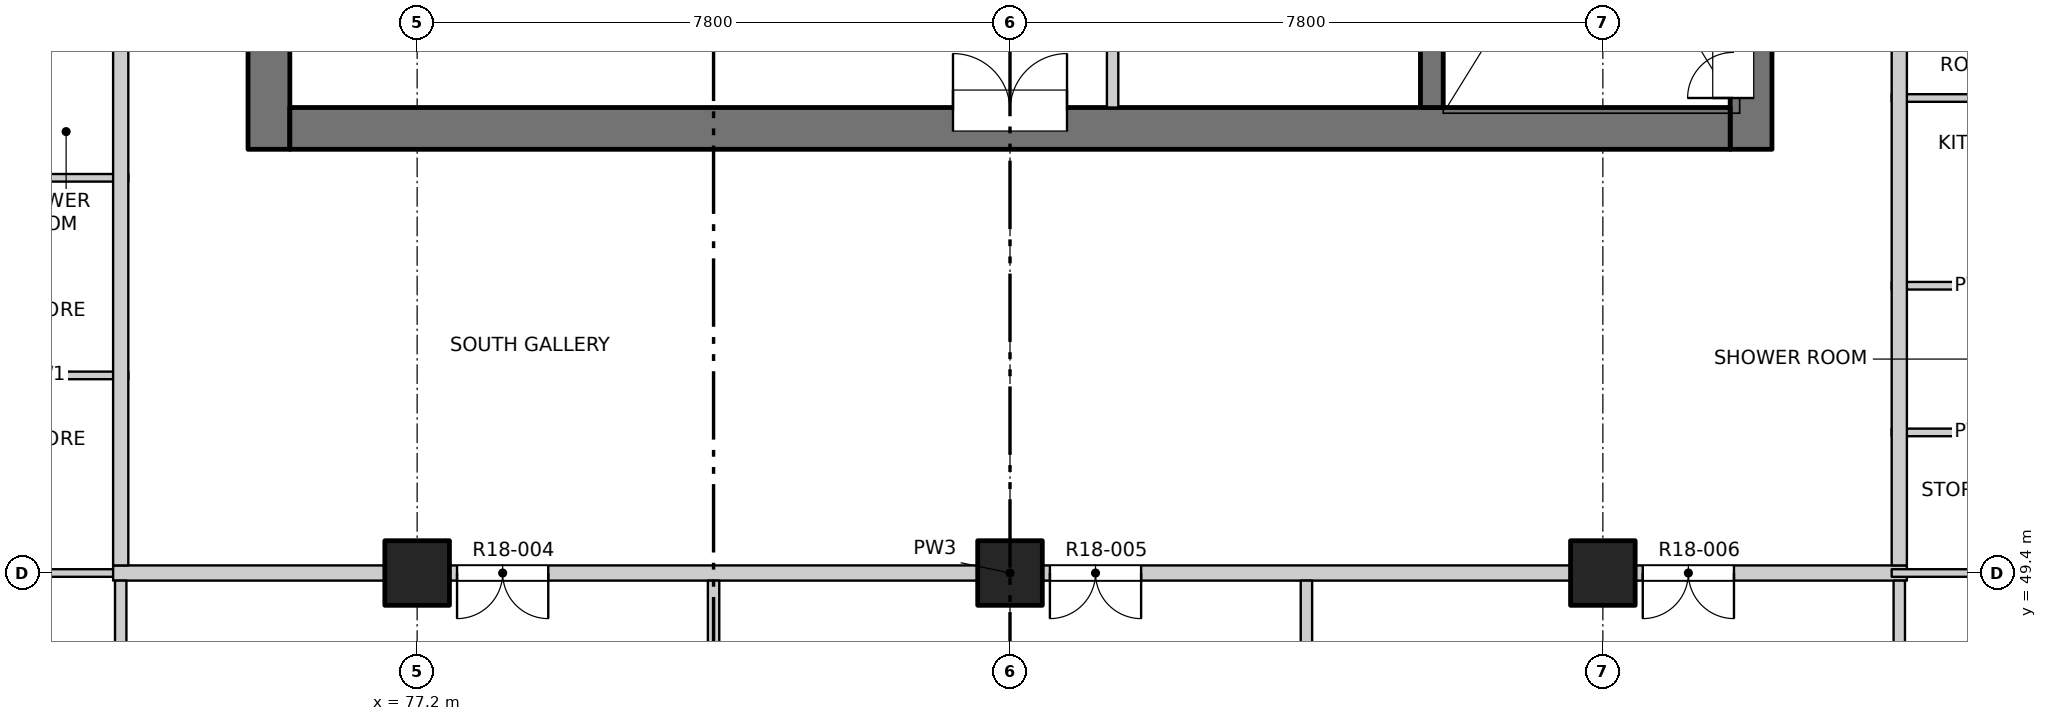
"""IFC4 building model, lengths in metres.
Left out: names, types, materials, properties, quantities, classifications, styles, units other than length and angle.
Written with IfcOpenShell. Run it as: python <this file> out.ifc"""

import sys

from ifc_helpers import new_model, si_unit, direction, frame, frame_2d, origin, origin_2d, place, context, subcontext, project, spatial, rectangle, extrude, element, fill, save


model = new_model("IFC4")
c1 = context("Model", 3, precision=1e-05, world=origin(), true_north=direction((0.0, 1.0)))
c2 = subcontext(c1, "Body", "Model", "MODEL_VIEW")
j1 = project(units=[si_unit("LENGTHUNIT", "METRE"), si_unit("PLANEANGLEUNIT", "RADIAN")], contexts=[c1])
p1 = place(None, origin())
s1 = spatial("IfcSite", under=j1, at=p1, CompositionType="ELEMENT")
p2 = place(p1, origin())
s2 = spatial("IfcBuilding", under=s1, at=p2, CompositionType="ELEMENT")
p3 = place(p2, frame((0.0, 0.0, 186.0)))
s3 = spatial("IfcBuildingStorey", under=s2, at=p3, CompositionType="ELEMENT", Elevation=186.0)
for number, where, z_axis, x_axis in (
    (1, (77.2, 49.4, -0.25), (0.0, 0.0, 1.0), (1.0, 0.0, 0.0)),
    (2, (85.0, 49.4, -0.25), (0.0, 0.0, 1.0), (1.0, 0.0, 0.0)),
    (3, (92.8, 49.4, -0.25), (0.0, 0.0, 1.0), (1.0, 0.0, 0.0)),
):
    element("IfcColumn", number, at=place(p3, frame(where, z_axis=z_axis, x_axis=x_axis)), inside=s3, PredefinedType="COLUMN", context=c2, shape_type="SweptSolid", body=[
        extrude(rectangle(XDim=0.85, YDim=0.85, at=origin_2d()), origin(), (0.0, 0.0, 1.0), 3.4),
    ])
p4 = place(p3, frame((75.25, 54.975, -0.25), z_axis=(0.0, 0.0, 1.0), x_axis=(0.0, 1.0, 0.0)))
e4 = element("IfcWall", 4, at=p4, inside=s3, PredefinedType="SOLIDWALL", context=c2, shape_type="SweptSolid", body=[
    extrude(rectangle(XDim=22.325, YDim=0.55, at=frame_2d((11.163, 0.0))), origin(), (0.0, 0.0, 1.0), 3.4),
])
p5 = place(p4, frame((7.475, 0.0, 0.25)))
e5 = element("IfcOpeningElement", 5, at=p5, cuts=e4, PredefinedType="OPENING", context=c2, shape_type="SweptSolid", body=[
    extrude(rectangle(XDim=0.9, YDim=2.1, at=frame_2d((0.45, 1.05))), frame((0.0, 0.285, 0.0), z_axis=(0.0, -1.0, 0.0), x_axis=(1.0, 0.0, 0.0)), (0.0, 0.0, 1.0), 0.57),
])
p6 = place(p4, frame((10.775, 0.0, 0.25)))
e6 = element("IfcOpeningElement", 6, at=p6, cuts=e4, PredefinedType="OPENING", context=c2, shape_type="SweptSolid", body=[
    extrude(rectangle(XDim=0.9, YDim=2.1, at=frame_2d((0.45, 1.05))), frame((0.0, 0.285, 0.0), z_axis=(0.0, -1.0, 0.0), x_axis=(1.0, 0.0, 0.0)), (0.0, 0.0, 1.0), 0.57),
])
p7 = place(p4, frame((13.775, 0.0, 0.25)))
e7 = element("IfcOpeningElement", 7, at=p7, cuts=e4, PredefinedType="OPENING", context=c2, shape_type="SweptSolid", body=[
    extrude(rectangle(XDim=0.9, YDim=2.1, at=frame_2d((0.45, 1.05))), frame((0.0, 0.285, 0.0), z_axis=(0.0, -1.0, 0.0), x_axis=(1.0, 0.0, 0.0)), (0.0, 0.0, 1.0), 0.57),
])
p8 = place(p4, frame((16.775, 0.0, 0.25)))
e8 = element("IfcOpeningElement", 8, at=p8, cuts=e4, PredefinedType="OPENING", context=c2, shape_type="SweptSolid", body=[
    extrude(rectangle(XDim=0.9, YDim=2.1, at=frame_2d((0.45, 1.05))), frame((0.0, 0.285, 0.0), z_axis=(0.0, -1.0, 0.0), x_axis=(1.0, 0.0, 0.0)), (0.0, 0.0, 1.0), 0.57),
])
p9 = place(p4, frame((20.075, 0.0, 0.25)))
e9 = element("IfcOpeningElement", 9, at=p9, cuts=e4, PredefinedType="OPENING", context=c2, shape_type="SweptSolid", body=[
    extrude(rectangle(XDim=0.9, YDim=2.1, at=frame_2d((0.45, 1.05))), frame((0.0, 0.285, 0.0), z_axis=(0.0, -1.0, 0.0), x_axis=(1.0, 0.0, 0.0)), (0.0, 0.0, 1.0), 0.57),
])
p10 = place(p3, frame((94.75, 54.975, -0.25), z_axis=(0.0, 0.0, 1.0), x_axis=(0.0, 1.0, 0.0)))
e10 = element("IfcWall", 10, at=p10, inside=s3, PredefinedType="SOLIDWALL", context=c2, shape_type="SweptSolid", body=[
    extrude(rectangle(XDim=6.975, YDim=0.55, at=frame_2d((3.487, 0.0))), origin(), (0.0, 0.0, 1.0), 3.4),
])
p11 = place(p10, frame((0.675, 0.0, 0.25)))
e11 = element("IfcOpeningElement", 11, at=p11, cuts=e10, PredefinedType="OPENING", context=c2, shape_type="SweptSolid", body=[
    extrude(rectangle(XDim=1.2, YDim=2.1, at=frame_2d((0.6, 1.05))), frame((0.0, 0.285, 0.0), z_axis=(0.0, -1.0, 0.0), x_axis=(1.0, 0.0, 0.0)), (0.0, 0.0, 1.0), 0.57),
])
p12 = place(p3, frame((75.525, 55.25, -0.25), z_axis=(0.0, 0.0, 1.0), x_axis=(1.0, 0.0, 0.0)))
e12 = element("IfcWall", 12, at=p12, inside=s3, PredefinedType="SOLIDWALL", context=c2, shape_type="SweptSolid", body=[
    extrude(rectangle(XDim=18.95, YDim=0.55, at=frame_2d((9.475, 0.0))), origin(), (0.0, 0.0, 1.0), 3.4),
])
p13 = place(p12, frame((8.725, 0.0, 0.25)))
e13 = element("IfcOpeningElement", 13, at=p13, cuts=e12, PredefinedType="OPENING", context=c2, shape_type="SweptSolid", body=[
    extrude(rectangle(XDim=1.5, YDim=2.1, at=frame_2d((0.75, 1.05))), frame((0.0, 0.285, 0.0), z_axis=(0.0, -1.0, 0.0), x_axis=(1.0, 0.0, 0.0)), (0.0, 0.0, 1.0), 0.57),
])
p14 = place(p3, frame((90.55, 55.525, -0.25), z_axis=(0.0, 0.0, 1.0), x_axis=(0.0, 1.0, 0.0)))
e14 = element("IfcWall", 14, at=p14, inside=s3, PredefinedType="SOLIDWALL", context=c2, shape_type="SweptSolid", body=[
    extrude(rectangle(XDim=6.425, YDim=0.3, at=frame_2d((3.212, 0.0))), origin(), (0.0, 0.0, 1.0), 3.4),
])
p15 = place(p3, frame((65.8, 49.4, 0.0), z_axis=(0.0, 0.0, 1.0), x_axis=(1.0, 0.0, 0.0)))
e15 = element("IfcWall", 15, at=p15, inside=s3, PredefinedType="PARTITIONING", context=c2, shape_type="SweptSolid", body=[
    extrude(rectangle(XDim=7.6, YDim=0.1, at=frame_2d((3.8, 0.0))), origin(), (0.0, 0.0, 1.0), 3.15),
])
p16 = place(p15, frame((4.14, 0.0, 0.0)))
e16 = element("IfcOpeningElement", 16, at=p16, cuts=e15, PredefinedType="OPENING", context=c2, shape_type="SweptSolid", body=[
    extrude(rectangle(XDim=0.9, YDim=2.1, at=frame_2d((0.45, 1.05))), frame((0.0, 0.06, 0.0), z_axis=(0.0, -1.0, 0.0), x_axis=(1.0, 0.0, 0.0)), (0.0, 0.0, 1.0), 0.12),
])
p17 = place(p3, frame((73.2, 49.4, 0.0), z_axis=(0.0, 0.0, 1.0), x_axis=(1.0, 0.0, 0.0)))
e17 = element("IfcWall", 17, at=p17, inside=s3, PredefinedType="PARTITIONING", context=c2, shape_type="SweptSolid", body=[
    extrude(rectangle(XDim=23.6, YDim=0.2, at=frame_2d((11.8, 0.0))), origin(), (0.0, 0.0, 1.0), 3.15),
])
p18 = place(p17, frame((4.525, 0.0, 0.0)))
e18 = element("IfcOpeningElement", 18, at=p18, cuts=e17, PredefinedType="OPENING", context=c2, shape_type="SweptSolid", body=[
    extrude(rectangle(XDim=1.2, YDim=2.1, at=frame_2d((0.6, 1.05))), frame((0.0, 0.11, 0.0), z_axis=(0.0, -1.0, 0.0), x_axis=(1.0, 0.0, 0.0)), (0.0, 0.0, 1.0), 0.22),
])
p19 = place(p17, frame((12.325, 0.0, 0.0)))
e19 = element("IfcOpeningElement", 19, at=p19, cuts=e17, PredefinedType="OPENING", context=c2, shape_type="SweptSolid", body=[
    extrude(rectangle(XDim=1.2, YDim=2.1, at=frame_2d((0.6, 1.05))), frame((0.0, 0.11, 0.0), z_axis=(0.0, -1.0, 0.0), x_axis=(1.0, 0.0, 0.0)), (0.0, 0.0, 1.0), 0.22),
])
p20 = place(p17, frame((20.125, 0.0, 0.0)))
e20 = element("IfcOpeningElement", 20, at=p20, cuts=e17, PredefinedType="OPENING", context=c2, shape_type="SweptSolid", body=[
    extrude(rectangle(XDim=1.2, YDim=2.1, at=frame_2d((0.6, 1.05))), frame((0.0, 0.11, 0.0), z_axis=(0.0, -1.0, 0.0), x_axis=(1.0, 0.0, 0.0)), (0.0, 0.0, 1.0), 0.22),
])
p21 = place(p3, frame((96.6, 49.4, 0.0), z_axis=(0.0, 0.0, 1.0), x_axis=(1.0, 0.0, 0.0)))
e21 = element("IfcWall", 21, at=p21, inside=s3, PredefinedType="PARTITIONING", context=c2, shape_type="SweptSolid", body=[
    extrude(rectangle(XDim=7.6, YDim=0.1, at=frame_2d((3.8, 0.0))), origin(), (0.0, 0.0, 1.0), 3.15),
])
p22 = place(p21, frame((2.56, 0.0, 0.0)))
e22 = element("IfcOpeningElement", 22, at=p22, cuts=e21, PredefinedType="OPENING", context=c2, shape_type="SweptSolid", body=[
    extrude(rectangle(XDim=0.9, YDim=2.1, at=frame_2d((0.45, 1.05))), frame((0.0, 0.06, 0.0), z_axis=(0.0, -1.0, 0.0), x_axis=(1.0, 0.0, 0.0)), (0.0, 0.0, 1.0), 0.12),
])
for number, where, z_axis, x_axis in (
    (23, (96.6, 51.25, 0.0), (0.0, 0.0, 1.0), (1.0, 0.0, 0.0)),
    (24, (71.18, 52.0, 0.0), (0.0, 0.0, 1.0), (1.0, 0.0, 0.0)),
    (25, (96.6, 53.18, 0.0), (0.0, 0.0, 1.0), (1.0, 0.0, 0.0)),
    (26, (71.18, 54.6, 0.0), (0.0, 0.0, 1.0), (1.0, 0.0, 0.0)),
    (27, (96.6, 55.65, 0.0), (0.0, 0.0, 1.0), (1.0, 0.0, 0.0)),
):
    element("IfcWall", number, at=place(p3, frame(where, z_axis=z_axis, x_axis=x_axis)), inside=s3, PredefinedType="PARTITIONING", context=c2, shape_type="SweptSolid", body=[
        extrude(rectangle(XDim=2.22, YDim=0.1, at=frame_2d((1.11, 0.0))), origin(), (0.0, 0.0, 1.0), 3.15),
    ])
p23 = place(p3, frame((73.3, 45.8, 0.0), z_axis=(0.0, 0.0, 1.0), x_axis=(0.0, 1.0, 0.0)))
e28 = element("IfcWall", 28, at=p23, inside=s3, PredefinedType="PARTITIONING", context=c2, shape_type="SweptSolid", body=[
    extrude(rectangle(XDim=3.5, YDim=0.15, at=frame_2d((1.75, 0.0))), origin(), (0.0, 0.0, 1.0), 3.15),
])
p24 = place(p3, frame((73.3, 49.5, 0.0), z_axis=(0.0, 0.0, 1.0), x_axis=(0.0, 1.0, 0.0)))
e29 = element("IfcWall", 29, at=p24, inside=s3, PredefinedType="PARTITIONING", context=c2, shape_type="SweptSolid", body=[
    extrude(rectangle(XDim=34.7, YDim=0.2, at=frame_2d((17.35, 0.0))), origin(), (0.0, 0.0, 1.0), 3.15),
])
p25 = place(p24, frame((13.825, 0.0, 0.0)))
e30 = element("IfcOpeningElement", 30, at=p25, cuts=e29, PredefinedType="OPENING", context=c2, shape_type="SweptSolid", body=[
    extrude(rectangle(XDim=1.0, YDim=2.1, at=frame_2d((0.5, 1.05))), frame((0.0, 0.11, 0.0), z_axis=(0.0, -1.0, 0.0), x_axis=(1.0, 0.0, 0.0)), (0.0, 0.0, 1.0), 0.22),
])
p26 = place(p24, frame((21.975, 0.0, 0.0)))
e31 = element("IfcOpeningElement", 31, at=p26, cuts=e29, PredefinedType="OPENING", context=c2, shape_type="SweptSolid", body=[
    extrude(rectangle(XDim=1.0, YDim=2.1, at=frame_2d((0.5, 1.05))), frame((0.0, 0.11, 0.0), z_axis=(0.0, -1.0, 0.0), x_axis=(1.0, 0.0, 0.0)), (0.0, 0.0, 1.0), 0.22),
])
p27 = place(p3, frame((81.1, 45.8, 0.0), z_axis=(0.0, 0.0, 1.0), x_axis=(0.0, 1.0, 0.0)))
e32 = element("IfcWall", 32, at=p27, inside=s3, PredefinedType="PARTITIONING", context=c2, shape_type="SweptSolid", body=[
    extrude(rectangle(XDim=3.5, YDim=0.15, at=frame_2d((1.75, 0.0))), origin(), (0.0, 0.0, 1.0), 3.15),
])
p28 = place(p3, frame((86.35, 55.525, 0.0), z_axis=(0.0, 0.0, 1.0), x_axis=(0.0, 1.0, 0.0)))
e33 = element("IfcWall", 33, at=p28, inside=s3, PredefinedType="PARTITIONING", context=c2, shape_type="SweptSolid", body=[
    extrude(rectangle(XDim=5.5, YDim=0.15, at=frame_2d((2.75, 0.0))), origin(), (0.0, 0.0, 1.0), 3.15),
])
p29 = place(p28, frame((2.175, 0.0, 0.0)))
e34 = element("IfcOpeningElement", 34, at=p29, cuts=e33, PredefinedType="OPENING", context=c2, shape_type="SweptSolid", body=[
    extrude(rectangle(XDim=0.9, YDim=2.1, at=frame_2d((0.45, 1.05))), frame((0.0, 0.085, 0.0), z_axis=(0.0, -1.0, 0.0), x_axis=(1.0, 0.0, 0.0)), (0.0, 0.0, 1.0), 0.17),
])
for number, where, z_axis, x_axis in (
    (35, (88.9, 45.8, 0.0), (0.0, 0.0, 1.0), (0.0, 1.0, 0.0)),
    (36, (96.7, 45.8, 0.0), (0.0, 0.0, 1.0), (0.0, 1.0, 0.0)),
):
    element("IfcWall", number, at=place(p3, frame(where, z_axis=z_axis, x_axis=x_axis)), inside=s3, PredefinedType="PARTITIONING", context=c2, shape_type="SweptSolid", body=[
        extrude(rectangle(XDim=3.5, YDim=0.15, at=frame_2d((1.75, 0.0))), origin(), (0.0, 0.0, 1.0), 3.15),
    ])
p30 = place(p3, frame((96.7, 49.5, 0.0), z_axis=(0.0, 0.0, 1.0), x_axis=(0.0, 1.0, 0.0)))
e37 = element("IfcWall", 37, at=p30, inside=s3, PredefinedType="PARTITIONING", context=c2, shape_type="SweptSolid", body=[
    extrude(rectangle(XDim=34.7, YDim=0.2, at=frame_2d((17.35, 0.0))), origin(), (0.0, 0.0, 1.0), 3.15),
])
p31 = place(p30, frame((7.425, 0.0, 0.0)))
e38 = element("IfcOpeningElement", 38, at=p31, cuts=e37, PredefinedType="OPENING", context=c2, shape_type="SweptSolid", body=[
    extrude(rectangle(XDim=1.0, YDim=2.1, at=frame_2d((0.5, 1.05))), frame((0.0, 0.11, 0.0), z_axis=(0.0, -1.0, 0.0), x_axis=(1.0, 0.0, 0.0)), (0.0, 0.0, 1.0), 0.22),
])
p32 = place(p30, frame((18.475, 0.0, 0.0)))
e39 = element("IfcOpeningElement", 39, at=p32, cuts=e37, PredefinedType="OPENING", context=c2, shape_type="SweptSolid", body=[
    extrude(rectangle(XDim=1.0, YDim=2.1, at=frame_2d((0.5, 1.05))), frame((0.0, 0.11, 0.0), z_axis=(0.0, -1.0, 0.0), x_axis=(1.0, 0.0, 0.0)), (0.0, 0.0, 1.0), 0.22),
])
p33 = place(p30, frame((29.025, 0.0, 0.0)))
e40 = element("IfcOpeningElement", 40, at=p33, cuts=e37, PredefinedType="OPENING", context=c2, shape_type="SweptSolid", body=[
    extrude(rectangle(XDim=1.0, YDim=2.1, at=frame_2d((0.5, 1.05))), frame((0.0, 0.11, 0.0), z_axis=(0.0, -1.0, 0.0), x_axis=(1.0, 0.0, 0.0)), (0.0, 0.0, 1.0), 0.22),
])
p34 = place(p18, origin())
e41 = element("IfcDoor", 41, at=p34, inside=s3, OperationType="DOUBLE_DOOR_SINGLE_SWING", PredefinedType="DOOR", context=c2, shape_type="SweptSolid", body=[
    extrude(rectangle(XDim=1.2, YDim=2.1, at=frame_2d((0.6, 1.05))), frame((0.0, 0.025, 0.0), z_axis=(0.0, -1.0, 0.0), x_axis=(1.0, 0.0, 0.0)), (0.0, 0.0, 1.0), 0.05),
])
fill(e18, e41)
p35 = place(p19, origin())
e42 = element("IfcDoor", 42, at=p35, inside=s3, OperationType="DOUBLE_DOOR_SINGLE_SWING", PredefinedType="DOOR", context=c2, shape_type="SweptSolid", body=[
    extrude(rectangle(XDim=1.2, YDim=2.1, at=frame_2d((0.6, 1.05))), frame((0.0, 0.025, 0.0), z_axis=(0.0, -1.0, 0.0), x_axis=(1.0, 0.0, 0.0)), (0.0, 0.0, 1.0), 0.05),
])
fill(e19, e42)
p36 = place(p20, origin())
e43 = element("IfcDoor", 43, at=p36, inside=s3, OperationType="DOUBLE_DOOR_SINGLE_SWING", PredefinedType="DOOR", context=c2, shape_type="SweptSolid", body=[
    extrude(rectangle(XDim=1.2, YDim=2.1, at=frame_2d((0.6, 1.05))), frame((0.0, 0.025, 0.0), z_axis=(0.0, -1.0, 0.0), x_axis=(1.0, 0.0, 0.0)), (0.0, 0.0, 1.0), 0.05),
])
fill(e20, e43)
p37 = place(p13, origin())
e44 = element("IfcDoor", 44, at=p37, inside=s3, OperationType="DOUBLE_DOOR_SINGLE_SWING", PredefinedType="DOOR", context=c2, shape_type="SweptSolid", body=[
    extrude(rectangle(XDim=1.5, YDim=2.1, at=frame_2d((0.75, 1.05))), frame((0.0, 0.26, 0.0), z_axis=(0.0, -1.0, 0.0), x_axis=(1.0, 0.0, 0.0)), (0.0, 0.0, 1.0), 0.05),
])
fill(e13, e44)
p38 = place(p11, origin())
e45 = element("IfcDoor", 45, at=p38, inside=s3, OperationType="DOUBLE_DOOR_SINGLE_SWING", PredefinedType="DOOR", context=c2, shape_type="SweptSolid", body=[
    extrude(rectangle(XDim=1.2, YDim=2.1, at=frame_2d((0.6, 1.05))), frame((0.0, 0.26, 0.0), z_axis=(0.0, -1.0, 0.0), x_axis=(1.0, 0.0, 0.0)), (0.0, 0.0, 1.0), 0.05),
])
fill(e11, e45)
save(model, sys.argv[1])
